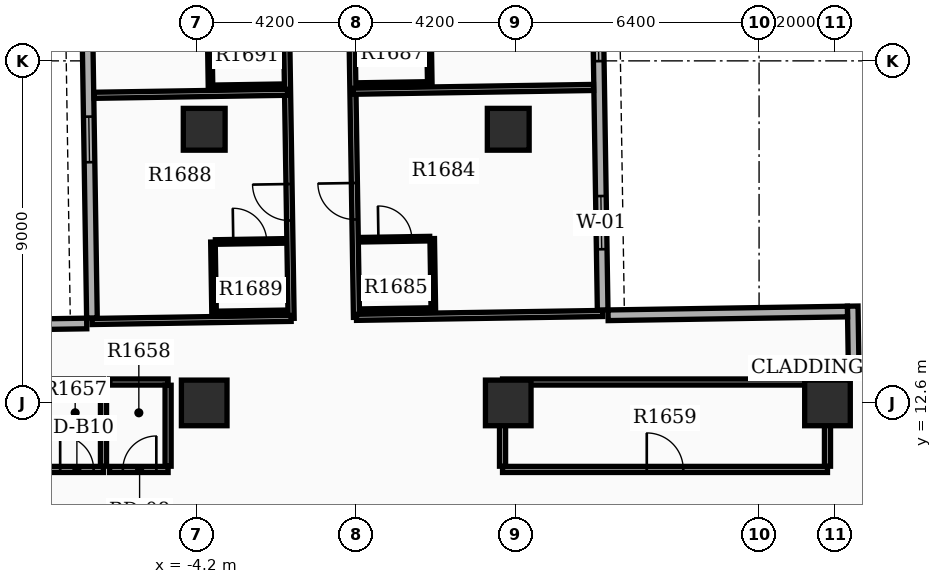
"""IFC4 building model, lengths in metres.
Left out: names, types, materials, properties, quantities, classifications, styles, units other than length and angle.
Written with IfcOpenShell. Run it as: python <this file> out.ifc"""

import sys

from ifc_helpers import new_model, si_unit, direction, frame, frame_2d, origin, origin_2d, place, context, subcontext, project, spatial, rectangle, extrude, element, fill, save


model = new_model("IFC4")
c1 = context("Model", 3, precision=1e-05, world=origin(), true_north=direction((0.0, 1.0)))
c2 = subcontext(c1, "Body", "Model", "MODEL_VIEW")
j1 = project(units=[si_unit("LENGTHUNIT", "METRE"), si_unit("PLANEANGLEUNIT", "RADIAN")], contexts=[c1])
p1 = place(None, origin())
s1 = spatial("IfcSite", under=j1, at=p1, CompositionType="ELEMENT")
p2 = place(p1, origin())
s2 = spatial("IfcBuilding", under=s1, at=p2, CompositionType="ELEMENT")
p3 = place(p2, frame((0.0, 0.0, 108.6)))
s3 = spatial("IfcBuildingStorey", under=s2, at=p3, CompositionType="ELEMENT", Elevation=108.6)
for number, where, z_axis, x_axis in (
    (1, (12.4, 12.6, 0.0), (0.0, 0.0, 1.0), (1.0, 0.0, 0.0)),
    (2, (4.0, 12.6, 0.0), (0.0, 0.0, 1.0), (1.0, 0.0, 0.0)),
    (3, (-4.0, 12.6, 0.0), (0.0, 0.0, 1.0), (1.0, 0.0, 0.0)),
):
    element("IfcColumn", number, at=place(p3, frame(where, z_axis=z_axis, x_axis=x_axis)), inside=s3, PredefinedType="COLUMN", context=c2, shape_type="SweptSolid", body=[
        extrude(rectangle(XDim=1.2, YDim=1.2, at=origin_2d()), origin(), (0.0, 0.0, 1.0), 3.9),
    ])
for number, where, z_axis, x_axis in (
    (4, (-4.0, 19.8, 0.0), (0.0, 0.0, 1.0), (1.0, 0.0, 0.0)),
    (5, (4.0, 19.8, 0.0), (0.0, 0.0, 1.0), (1.0, 0.0, 0.0)),
):
    element("IfcColumn", number, at=place(p3, frame(where, z_axis=z_axis, x_axis=x_axis)), inside=s3, PredefinedType="COLUMN", context=c2, shape_type="SweptSolid", body=[
        extrude(rectangle(XDim=1.1, YDim=1.1, at=origin_2d()), origin(), (0.0, 0.0, 1.0), 3.9),
    ])
p4 = place(p3, frame((6.485, 15.044, 0.0), z_axis=(0.0, 0.0, 1.0), x_axis=(-0.01571739401, 0.999876474133, 0.0)))
e6 = element("IfcWall", 6, at=p4, inside=s3, PredefinedType="STANDARD", context=c2, shape_type="SweptSolid", body=[
    extrude(rectangle(XDim=20.1, YDim=0.28, at=frame_2d((10.05, 0.0))), origin(), (0.0, 0.0, 1.0), 2.97),
])
p5 = place(p4, frame((1.6, 0.0, 0.8)))
e7 = element("IfcOpeningElement", 7, at=p5, cuts=e6, PredefinedType="OPENING", context=c2, shape_type="SweptSolid", body=[
    extrude(rectangle(XDim=1.4, YDim=1.6, at=frame_2d((0.7, 0.8))), frame((0.0, 0.15, 0.0), z_axis=(0.0, -1.0, 0.0), x_axis=(1.0, 0.0, 0.0)), (0.0, 0.0, 1.0), 0.3),
])
p6 = place(p4, frame((6.55, 0.0, 0.8)))
e8 = element("IfcOpeningElement", 8, at=p6, cuts=e6, PredefinedType="OPENING", context=c2, shape_type="SweptSolid", body=[
    extrude(rectangle(XDim=1.4, YDim=1.6, at=frame_2d((0.7, 0.8))), frame((0.0, 0.15, 0.0), z_axis=(0.0, -1.0, 0.0), x_axis=(1.0, 0.0, 0.0)), (0.0, 0.0, 1.0), 0.3),
])
p7 = place(p4, frame((10.25, 0.0, 0.8)))
e9 = element("IfcOpeningElement", 9, at=p7, cuts=e6, PredefinedType="OPENING", context=c2, shape_type="SweptSolid", body=[
    extrude(rectangle(XDim=1.4, YDim=1.6, at=frame_2d((0.7, 0.8))), frame((0.0, 0.15, 0.0), z_axis=(0.0, -1.0, 0.0), x_axis=(1.0, 0.0, 0.0)), (0.0, 0.0, 1.0), 0.3),
])
p8 = place(p4, frame((13.45, 0.0, 0.8)))
e10 = element("IfcOpeningElement", 10, at=p8, cuts=e6, PredefinedType="OPENING", context=c2, shape_type="SweptSolid", body=[
    extrude(rectangle(XDim=1.4, YDim=1.6, at=frame_2d((0.7, 0.8))), frame((0.0, 0.15, 0.0), z_axis=(0.0, -1.0, 0.0), x_axis=(1.0, 0.0, 0.0)), (0.0, 0.0, 1.0), 0.3),
])
p9 = place(p3, frame((-7.27, 34.93, 0.0), z_axis=(0.0, 0.0, 1.0), x_axis=(0.015705059908, -0.999876667941, 0.0)))
e11 = element("IfcWall", 11, at=p9, inside=s3, PredefinedType="STANDARD", context=c2, shape_type="SweptSolid", body=[
    extrude(rectangle(XDim=20.1, YDim=0.28, at=frame_2d((10.05, 0.0))), origin(), (0.0, 0.0, 1.0), 2.97),
])
p10 = place(p9, frame((1.6, 0.0, 0.8)))
e12 = element("IfcOpeningElement", 12, at=p10, cuts=e11, PredefinedType="OPENING", context=c2, shape_type="SweptSolid", body=[
    extrude(rectangle(XDim=1.4, YDim=1.6, at=frame_2d((0.7, 0.8))), frame((0.0, 0.15, 0.0), z_axis=(0.0, -1.0, 0.0), x_axis=(1.0, 0.0, 0.0)), (0.0, 0.0, 1.0), 0.3),
])
p11 = place(p9, frame((4.8, 0.0, 0.8)))
e13 = element("IfcOpeningElement", 13, at=p11, cuts=e11, PredefinedType="OPENING", context=c2, shape_type="SweptSolid", body=[
    extrude(rectangle(XDim=1.4, YDim=1.6, at=frame_2d((0.7, 0.8))), frame((0.0, 0.15, 0.0), z_axis=(0.0, -1.0, 0.0), x_axis=(1.0, 0.0, 0.0)), (0.0, 0.0, 1.0), 0.3),
])
p12 = place(p9, frame((8.0, 0.0, 0.8)))
e14 = element("IfcOpeningElement", 14, at=p12, cuts=e11, PredefinedType="OPENING", context=c2, shape_type="SweptSolid", body=[
    extrude(rectangle(XDim=1.4, YDim=1.6, at=frame_2d((0.7, 0.8))), frame((0.0, 0.15, 0.0), z_axis=(0.0, -1.0, 0.0), x_axis=(1.0, 0.0, 0.0)), (0.0, 0.0, 1.0), 0.3),
])
p13 = place(p9, frame((11.2, 0.0, 0.8)))
e15 = element("IfcOpeningElement", 15, at=p13, cuts=e11, PredefinedType="OPENING", context=c2, shape_type="SweptSolid", body=[
    extrude(rectangle(XDim=1.4, YDim=1.6, at=frame_2d((0.7, 0.8))), frame((0.0, 0.15, 0.0), z_axis=(0.0, -1.0, 0.0), x_axis=(1.0, 0.0, 0.0)), (0.0, 0.0, 1.0), 0.3),
])
p14 = place(p9, frame((14.799, 0.0, 0.85)))
e16 = element("IfcOpeningElement", 16, at=p14, cuts=e11, PredefinedType="OPENING", context=c2, shape_type="SweptSolid", body=[
    extrude(rectangle(XDim=1.2, YDim=1.6, at=frame_2d((0.6, 0.8))), frame((0.0, 0.15, 0.0), z_axis=(0.0, -1.0, 0.0), x_axis=(1.0, 0.0, 0.0)), (0.0, 0.0, 1.0), 0.3),
])
p15 = place(p3, frame((14.449, 13.529, 0.0), z_axis=(0.0, 0.0, 1.0), x_axis=(-0.999878147354, -0.015610587569, 0.0)))
e17 = element("IfcWall", 17, at=p15, inside=s3, PredefinedType="STANDARD", context=c2, shape_type="SweptSolid", body=[
    extrude(rectangle(XDim=1.22, YDim=0.28, at=frame_2d((0.61, 0.0))), origin(), (0.0, 0.0, 1.0), 2.97),
])
p16 = place(p3, frame((13.087, 13.647, 0.0), z_axis=(0.0, 0.0, 1.0), x_axis=(-0.015785793208, 0.999875396603, 0.0)))
e18 = element("IfcWall", 18, at=p16, inside=s3, PredefinedType="STANDARD", context=c2, shape_type="SweptSolid", body=[
    extrude(rectangle(XDim=1.5, YDim=0.28, at=frame_2d((0.75, 0.0))), origin(), (0.0, 0.0, 1.0), 2.97),
])
p17 = place(p3, frame((12.926, 15.005, 0.0), z_axis=(0.0, 0.0, 1.0), x_axis=(-0.999876823822, -0.015695132501, 0.0)))
e19 = element("IfcWall", 19, at=p17, inside=s3, PredefinedType="STANDARD", context=c2, shape_type="SweptSolid", body=[
    extrude(rectangle(XDim=6.3, YDim=0.28, at=frame_2d((3.15, 0.0))), origin(), (0.0, 0.0, 1.0), 2.97),
])
p18 = place(p3, frame((-13.391, 14.592, 0.0), z_axis=(0.0, 0.0, 1.0), x_axis=(0.999876833368, 0.015694524359, 0.0)))
e20 = element("IfcWall", 20, at=p18, inside=s3, PredefinedType="STANDARD", context=c2, shape_type="SweptSolid", body=[
    extrude(rectangle(XDim=6.3, YDim=0.28, at=frame_2d((3.15, 0.0))), origin(), (0.0, 0.0, 1.0), 2.97),
])
p19 = place(p3, frame((-8.14, 10.85, 0.0), z_axis=(0.0, 0.0, 1.0), x_axis=(1.0, 0.0, 0.0)))
e21 = element("IfcWall", 21, at=p19, inside=s3, PredefinedType="PARTITIONING", context=c2, shape_type="SweptSolid", body=[
    extrude(rectangle(XDim=1.49, YDim=0.16, at=frame_2d((0.745, 0.0))), origin(), (0.0, 0.0, 1.0), 2.96),
])
p20 = place(p19, frame((0.35, 0.0, 0.0)))
e22 = element("IfcOpeningElement", 22, at=p20, cuts=e21, PredefinedType="OPENING", context=c2, shape_type="SweptSolid", body=[
    extrude(rectangle(XDim=0.88, YDim=2.1, at=frame_2d((0.44, 1.05))), frame((0.0, 0.09, 0.0), z_axis=(0.0, -1.0, 0.0), x_axis=(1.0, 0.0, 0.0)), (0.0, 0.0, 1.0), 0.18),
])
p21 = place(p3, frame((-8.14, 13.15, 0.0), z_axis=(0.0, 0.0, 1.0), x_axis=(1.0, 0.0, 0.0)))
e23 = element("IfcWall", 23, at=p21, inside=s3, PredefinedType="PARTITIONING", context=c2, shape_type="SweptSolid", body=[
    extrude(rectangle(XDim=1.49, YDim=0.16, at=frame_2d((0.745, 0.0))), origin(), (0.0, 0.0, 1.0), 2.96),
])
p22 = place(p3, frame((-6.65, 10.935, 0.0), z_axis=(0.0, 0.0, 1.0), x_axis=(0.0, 1.0, 0.0)))
e24 = element("IfcWall", 24, at=p22, inside=s3, PredefinedType="PARTITIONING", context=c2, shape_type="SweptSolid", body=[
    extrude(rectangle(XDim=2.13, YDim=0.16, at=frame_2d((1.065, 0.0))), origin(), (0.0, 0.0, 1.0), 2.96),
])
p23 = place(p3, frame((-6.49, 10.85, 0.0), z_axis=(0.0, 0.0, 1.0), x_axis=(1.0, 0.0, 0.0)))
e25 = element("IfcWall", 25, at=p23, inside=s3, PredefinedType="PARTITIONING", context=c2, shape_type="SweptSolid", body=[
    extrude(rectangle(XDim=1.54, YDim=0.16, at=frame_2d((0.77, 0.0))), origin(), (0.0, 0.0, 1.0), 2.96),
])
p24 = place(p23, frame((0.35, 0.0, 0.0)))
e26 = element("IfcOpeningElement", 26, at=p24, cuts=e25, PredefinedType="OPENING", context=c2, shape_type="SweptSolid", body=[
    extrude(rectangle(XDim=0.88, YDim=2.15, at=frame_2d((0.44, 1.075))), frame((0.0, 0.09, 0.0), z_axis=(0.0, -1.0, 0.0), x_axis=(1.0, 0.0, 0.0)), (0.0, 0.0, 1.0), 0.18),
])
p25 = place(p3, frame((-6.49, 13.15, 0.0), z_axis=(0.0, 0.0, 1.0), x_axis=(1.0, 0.0, 0.0)))
e27 = element("IfcWall", 27, at=p25, inside=s3, PredefinedType="PARTITIONING", context=c2, shape_type="SweptSolid", body=[
    extrude(rectangle(XDim=1.54, YDim=0.16, at=frame_2d((0.77, 0.0))), origin(), (0.0, 0.0, 1.0), 2.96),
])
p26 = place(p3, frame((-4.95, 10.935, 0.0), z_axis=(0.0, 0.0, 1.0), x_axis=(0.0, 1.0, 0.0)))
e28 = element("IfcWall", 28, at=p26, inside=s3, PredefinedType="PARTITIONING", context=c2, shape_type="SweptSolid", body=[
    extrude(rectangle(XDim=2.13, YDim=0.16, at=frame_2d((1.065, 0.0))), origin(), (0.0, 0.0, 1.0), 2.96),
])
p27 = place(p3, frame((3.85, 10.85, 0.0), z_axis=(0.0, 0.0, 1.0), x_axis=(1.0, 0.0, 0.0)))
e29 = element("IfcWall", 29, at=p27, inside=s3, PredefinedType="PARTITIONING", context=c2, shape_type="SweptSolid", body=[
    extrude(rectangle(XDim=8.55, YDim=0.16, at=frame_2d((4.275, 0.0))), origin(), (0.0, 0.0, 1.0), 2.96),
])
p28 = place(p27, frame((3.795, 0.0, 0.0)))
e30 = element("IfcOpeningElement", 30, at=p28, cuts=e29, PredefinedType="OPENING", context=c2, shape_type="SweptSolid", body=[
    extrude(rectangle(XDim=0.96, YDim=2.15, at=frame_2d((0.48, 1.075))), frame((0.0, 0.09, 0.0), z_axis=(0.0, -1.0, 0.0), x_axis=(1.0, 0.0, 0.0)), (0.0, 0.0, 1.0), 0.18),
])
p29 = place(p3, frame((3.85, 13.15, 0.0), z_axis=(0.0, 0.0, 1.0), x_axis=(1.0, 0.0, 0.0)))
e31 = element("IfcWall", 31, at=p29, inside=s3, PredefinedType="PARTITIONING", context=c2, shape_type="SweptSolid", body=[
    extrude(rectangle(XDim=8.55, YDim=0.16, at=frame_2d((4.275, 0.0))), origin(), (0.0, 0.0, 1.0), 2.96),
])
for number, where, z_axis, x_axis in (
    (32, (3.85, 10.935, 0.0), (0.0, 0.0, 1.0), (0.0, 1.0, 0.0)),
    (33, (12.4, 10.935, 0.0), (0.0, 0.0, 1.0), (0.0, 1.0, 0.0)),
):
    element("IfcWall", number, at=place(p3, frame(where, z_axis=z_axis, x_axis=x_axis)), inside=s3, PredefinedType="PARTITIONING", context=c2, shape_type="SweptSolid", body=[
        extrude(rectangle(XDim=2.13, YDim=0.16, at=frame_2d((1.065, 0.0))), origin(), (0.0, 0.0, 1.0), 2.96),
    ])
p30 = place(p3, frame((0.007, 14.852, 0.0), z_axis=(0.0, 0.0, 1.0), x_axis=(-0.015680101899, 0.999877059645, 0.0)))
e34 = element("IfcWall", 34, at=p30, inside=s3, PredefinedType="PARTITIONING", context=c2, shape_type="SweptSolid", body=[
    extrude(rectangle(XDim=9.7, YDim=0.16, at=frame_2d((4.85, 0.0))), origin(), (0.0, 0.0, 1.0), 2.96),
])
p31 = place(p30, frame((2.575, 0.0, 0.0)))
e35 = element("IfcOpeningElement", 35, at=p31, cuts=e34, PredefinedType="OPENING", context=c2, shape_type="SweptSolid", body=[
    extrude(rectangle(XDim=0.96, YDim=2.15, at=frame_2d((0.48, 1.075))), frame((0.0, 0.09, 0.0), z_axis=(0.0, -1.0, 0.0), x_axis=(1.0, 0.0, 0.0)), (0.0, 0.0, 1.0), 0.18),
])
p32 = place(p30, frame((8.097, 0.0, 0.0)))
e36 = element("IfcOpeningElement", 36, at=p32, cuts=e34, PredefinedType="OPENING", context=c2, shape_type="SweptSolid", body=[
    extrude(rectangle(XDim=0.96, YDim=2.15, at=frame_2d((0.48, 1.075))), frame((0.0, 0.09, 0.0), z_axis=(0.0, -1.0, 0.0), x_axis=(1.0, 0.0, 0.0)), (0.0, 0.0, 1.0), 0.18),
])
p33 = place(p3, frame((0.007, 14.852, 0.0), z_axis=(0.0, 0.0, 1.0), x_axis=(0.999876577995, 0.015710785373, 0.0)))
e37 = element("IfcWall", 37, at=p33, inside=s3, PredefinedType="PARTITIONING", context=c2, shape_type="SweptSolid", body=[
    extrude(rectangle(XDim=6.48, YDim=0.16, at=frame_2d((3.24, 0.0))), origin(), (0.0, 0.0, 1.0), 2.96),
])
p34 = place(p3, frame((-0.087, 20.801, 0.0), z_axis=(0.0, 0.0, 1.0), x_axis=(0.999876857896, 0.015692961637, 0.0)))
e38 = element("IfcWall", 38, at=p34, inside=s3, PredefinedType="PARTITIONING", context=c2, shape_type="SweptSolid", body=[
    extrude(rectangle(XDim=6.332, YDim=0.16, at=frame_2d((3.166, 0.0))), origin(), (0.0, 0.0, 1.0), 2.96),
])
p35 = place(p3, frame((0.115, 16.894, 0.0), z_axis=(0.0, 0.0, 1.0), x_axis=(0.999874688728, 0.015830566654, 0.0)))
e39 = element("IfcWall", 39, at=p35, inside=s3, PredefinedType="PARTITIONING", context=c2, shape_type="SweptSolid", body=[
    extrude(rectangle(XDim=1.82, YDim=0.12, at=frame_2d((0.91, 0.0))), origin(), (0.0, 0.0, 1.0), 2.96),
])
p36 = place(p35, frame((0.47, 0.0, 0.0)))
e40 = element("IfcOpeningElement", 40, at=p36, cuts=e39, PredefinedType="OPENING", context=c2, shape_type="SweptSolid", body=[
    extrude(rectangle(XDim=0.88, YDim=2.1, at=frame_2d((0.44, 1.05))), frame((0.0, 0.07, 0.0), z_axis=(0.0, -1.0, 0.0), x_axis=(1.0, 0.0, 0.0)), (0.0, 0.0, 1.0), 0.14),
])
p37 = place(p3, frame((0.144, 15.014, 0.0), z_axis=(0.0, 0.0, 1.0), x_axis=(0.999876836305, 0.015694337248, 0.0)))
e41 = element("IfcWall", 41, at=p37, inside=s3, PredefinedType="PARTITIONING", context=c2, shape_type="SweptSolid", body=[
    extrude(rectangle(XDim=1.82, YDim=0.12, at=frame_2d((0.91, 0.0))), origin(), (0.0, 0.0, 1.0), 2.96),
])
p38 = place(p3, frame((2.029, 15.044, 0.0), z_axis=(0.0, 0.0, 1.0), x_axis=(-0.01571234584, 0.999876553475, 0.0)))
e42 = element("IfcWall", 42, at=p38, inside=s3, PredefinedType="PARTITIONING", context=c2, shape_type="SweptSolid", body=[
    extrude(rectangle(XDim=1.88, YDim=0.12, at=frame_2d((0.94, 0.0))), origin(), (0.0, 0.0, 1.0), 2.96),
])
p39 = place(p3, frame((0.051, 20.963, 0.0), z_axis=(0.0, 0.0, 1.0), x_axis=(0.999876836305, 0.015694337248, 0.0)))
e43 = element("IfcWall", 43, at=p39, inside=s3, PredefinedType="PARTITIONING", context=c2, shape_type="SweptSolid", body=[
    extrude(rectangle(XDim=1.82, YDim=0.12, at=frame_2d((0.91, 0.0))), origin(), (0.0, 0.0, 1.0), 2.96),
])
p40 = place(p3, frame((1.936, 20.993, 0.0), z_axis=(0.0, 0.0, 1.0), x_axis=(-0.015716050513, 0.999876495251, 0.0)))
e44 = element("IfcWall", 44, at=p40, inside=s3, PredefinedType="PARTITIONING", context=c2, shape_type="SweptSolid", body=[
    extrude(rectangle(XDim=1.6, YDim=0.12, at=frame_2d((0.8, 0.0))), origin(), (0.0, 0.0, 1.0), 2.96),
])
p41 = place(p3, frame((-1.713, 14.825, 0.0), z_axis=(0.0, 0.0, 1.0), x_axis=(-0.015705659641, 0.999876658521, 0.0)))
e45 = element("IfcWall", 45, at=p41, inside=s3, PredefinedType="PARTITIONING", context=c2, shape_type="SweptSolid", body=[
    extrude(rectangle(XDim=9.7, YDim=0.16, at=frame_2d((4.85, 0.0))), origin(), (0.0, 0.0, 1.0), 2.96),
])
p42 = place(p41, frame((2.575, 0.0, 0.0)))
e46 = element("IfcOpeningElement", 46, at=p42, cuts=e45, PredefinedType="OPENING", context=c2, shape_type="SweptSolid", body=[
    extrude(rectangle(XDim=0.96, YDim=2.15, at=frame_2d((0.48, 1.075))), frame((0.0, 0.09, 0.0), z_axis=(0.0, -1.0, 0.0), x_axis=(1.0, 0.0, 0.0)), (0.0, 0.0, 1.0), 0.18),
])
p43 = place(p41, frame((8.097, 0.0, 0.0)))
e47 = element("IfcOpeningElement", 47, at=p43, cuts=e45, PredefinedType="OPENING", context=c2, shape_type="SweptSolid", body=[
    extrude(rectangle(XDim=0.96, YDim=2.15, at=frame_2d((0.48, 1.075))), frame((0.0, 0.09, 0.0), z_axis=(0.0, -1.0, 0.0), x_axis=(1.0, 0.0, 0.0)), (0.0, 0.0, 1.0), 0.18),
])
p44 = place(p3, frame((-1.713, 14.825, 0.0), z_axis=(0.0, 0.0, 1.0), x_axis=(-0.99987672073, -0.015701698737, 0.0)))
e48 = element("IfcWall", 48, at=p44, inside=s3, PredefinedType="PARTITIONING", context=c2, shape_type="SweptSolid", body=[
    extrude(rectangle(XDim=5.24, YDim=0.16, at=frame_2d((2.62, 0.0))), origin(), (0.0, 0.0, 1.0), 2.96),
])
p45 = place(p3, frame((-1.806, 20.774, 0.0), z_axis=(0.0, 0.0, 1.0), x_axis=(-0.999876343559, -0.015725698427, 0.0)))
e49 = element("IfcWall", 49, at=p45, inside=s3, PredefinedType="PARTITIONING", context=c2, shape_type="SweptSolid", body=[
    extrude(rectangle(XDim=5.092, YDim=0.16, at=frame_2d((2.546, 0.0))), origin(), (0.0, 0.0, 1.0), 2.96),
])
p46 = place(p3, frame((-3.705, 16.834, 0.0), z_axis=(0.0, 0.0, 1.0), x_axis=(0.999876836305, 0.015694337248, 0.0)))
e50 = element("IfcWall", 50, at=p46, inside=s3, PredefinedType="PARTITIONING", context=c2, shape_type="SweptSolid", body=[
    extrude(rectangle(XDim=1.82, YDim=0.12, at=frame_2d((0.91, 0.0))), origin(), (0.0, 0.0, 1.0), 2.96),
])
p47 = place(p46, frame((0.47, 0.0, 0.0)))
e51 = element("IfcOpeningElement", 51, at=p47, cuts=e50, PredefinedType="OPENING", context=c2, shape_type="SweptSolid", body=[
    extrude(rectangle(XDim=0.88, YDim=2.1, at=frame_2d((0.44, 1.05))), frame((0.0, 0.07, 0.0), z_axis=(0.0, -1.0, 0.0), x_axis=(1.0, 0.0, 0.0)), (0.0, 0.0, 1.0), 0.14),
])
p48 = place(p3, frame((-3.675, 14.954, 0.0), z_axis=(0.0, 0.0, 1.0), x_axis=(0.999876803258, 0.015696442504, 0.0)))
e52 = element("IfcWall", 52, at=p48, inside=s3, PredefinedType="PARTITIONING", context=c2, shape_type="SweptSolid", body=[
    extrude(rectangle(XDim=1.82, YDim=0.12, at=frame_2d((0.91, 0.0))), origin(), (0.0, 0.0, 1.0), 2.96),
])
p49 = place(p3, frame((-3.74, 14.953, 0.0), z_axis=(0.0, 0.0, 1.0), x_axis=(-0.015842167482, 0.99987450499, 0.0)))
e53 = element("IfcWall", 53, at=p49, inside=s3, PredefinedType="PARTITIONING", context=c2, shape_type="SweptSolid", body=[
    extrude(rectangle(XDim=1.88, YDim=0.12, at=frame_2d((0.94, 0.0))), origin(), (0.0, 0.0, 1.0), 2.96),
])
p50 = place(p3, frame((-3.769, 20.903, 0.0), z_axis=(0.0, 0.0, 1.0), x_axis=(0.999876836305, 0.015694337248, 0.0)))
e54 = element("IfcWall", 54, at=p50, inside=s3, PredefinedType="PARTITIONING", context=c2, shape_type="SweptSolid", body=[
    extrude(rectangle(XDim=1.82, YDim=0.12, at=frame_2d((0.91, 0.0))), origin(), (0.0, 0.0, 1.0), 2.96),
])
p51 = place(p3, frame((-3.834, 20.902, 0.0), z_axis=(0.0, 0.0, 1.0), x_axis=(-0.015716050513, 0.999876495251, 0.0)))
e55 = element("IfcWall", 55, at=p51, inside=s3, PredefinedType="PARTITIONING", context=c2, shape_type="SweptSolid", body=[
    extrude(rectangle(XDim=1.6, YDim=0.12, at=frame_2d((0.8, 0.0))), origin(), (0.0, 0.0, 1.0), 2.96),
])
p52 = place(p5, origin())
e56 = element("IfcWindow", 56, at=p52, inside=s3, PartitioningType="SINGLE_PANEL", PredefinedType="WINDOW", context=c2, shape_type="SweptSolid", body=[
    extrude(rectangle(XDim=1.4, YDim=1.6, at=frame_2d((0.7, 0.8))), frame((0.0, 0.03, 0.0), z_axis=(0.0, -1.0, 0.0), x_axis=(1.0, 0.0, 0.0)), (0.0, 0.0, 1.0), 0.06),
])
fill(e7, e56)
p53 = place(p6, origin())
e57 = element("IfcWindow", 57, at=p53, inside=s3, PartitioningType="SINGLE_PANEL", PredefinedType="WINDOW", context=c2, shape_type="SweptSolid", body=[
    extrude(rectangle(XDim=1.4, YDim=1.6, at=frame_2d((0.7, 0.8))), frame((0.0, 0.03, 0.0), z_axis=(0.0, -1.0, 0.0), x_axis=(1.0, 0.0, 0.0)), (0.0, 0.0, 1.0), 0.06),
])
fill(e8, e57)
p54 = place(p14, origin())
e58 = element("IfcWindow", 58, at=p54, inside=s3, PartitioningType="SINGLE_PANEL", PredefinedType="WINDOW", context=c2, shape_type="SweptSolid", body=[
    extrude(rectangle(XDim=1.2, YDim=1.6, at=frame_2d((0.6, 0.8))), frame((0.0, 0.03, 0.0), z_axis=(0.0, -1.0, 0.0), x_axis=(1.0, 0.0, 0.0)), (0.0, 0.0, 1.0), 0.06),
])
fill(e16, e58)
p55 = place(p20, origin())
e59 = element("IfcDoor", 59, at=p55, inside=s3, OperationType="SINGLE_SWING_LEFT", PredefinedType="DOOR", context=c2, shape_type="SweptSolid", body=[
    extrude(rectangle(XDim=0.88, YDim=2.1, at=frame_2d((0.44, 1.05))), frame((0.0, 0.025, 0.0), z_axis=(0.0, -1.0, 0.0), x_axis=(1.0, 0.0, 0.0)), (0.0, 0.0, 1.0), 0.05),
])
fill(e22, e59)
p56 = place(p24, origin())
e60 = element("IfcDoor", 60, at=p56, inside=s3, OperationType="SINGLE_SWING_RIGHT", PredefinedType="DOOR", context=c2, shape_type="SweptSolid", body=[
    extrude(rectangle(XDim=0.88, YDim=2.15, at=frame_2d((0.44, 1.075))), frame((0.0, 0.025, 0.0), z_axis=(0.0, -1.0, 0.0), x_axis=(1.0, 0.0, 0.0)), (0.0, 0.0, 1.0), 0.05),
])
fill(e26, e60)
p57 = place(p28, origin())
e61 = element("IfcDoor", 61, at=p57, inside=s3, OperationType="SINGLE_SWING_LEFT", PredefinedType="DOOR", context=c2, shape_type="SweptSolid", body=[
    extrude(rectangle(XDim=0.96, YDim=2.15, at=frame_2d((0.48, 1.075))), frame((0.0, 0.025, 0.0), z_axis=(0.0, -1.0, 0.0), x_axis=(1.0, 0.0, 0.0)), (0.0, 0.0, 1.0), 0.05),
])
fill(e30, e61)
p58 = place(p31, origin())
e62 = element("IfcDoor", 62, at=p58, inside=s3, OperationType="SINGLE_SWING_RIGHT", PredefinedType="DOOR", context=c2, shape_type="SweptSolid", body=[
    extrude(rectangle(XDim=0.96, YDim=2.15, at=frame_2d((0.48, 1.075))), frame((0.0, 0.025, 0.0), z_axis=(0.0, -1.0, 0.0), x_axis=(1.0, 0.0, 0.0)), (0.0, 0.0, 1.0), 0.05),
])
fill(e35, e62)
p59 = place(p36, origin())
e63 = element("IfcDoor", 63, at=p59, inside=s3, OperationType="SINGLE_SWING_LEFT", PredefinedType="DOOR", context=c2, shape_type="SweptSolid", body=[
    extrude(rectangle(XDim=0.88, YDim=2.1, at=frame_2d((0.44, 1.05))), frame((0.0, 0.025, 0.0), z_axis=(0.0, -1.0, 0.0), x_axis=(1.0, 0.0, 0.0)), (0.0, 0.0, 1.0), 0.05),
])
fill(e40, e63)
p60 = place(p42, origin())
e64 = element("IfcDoor", 64, at=p60, inside=s3, OperationType="SINGLE_SWING_RIGHT", PredefinedType="DOOR", context=c2, shape_type="SweptSolid", body=[
    extrude(rectangle(XDim=0.96, YDim=2.15, at=frame_2d((0.48, 1.075))), frame((0.0, 0.025, 0.0), z_axis=(0.0, -1.0, 0.0), x_axis=(1.0, 0.0, 0.0)), (0.0, 0.0, 1.0), 0.05),
])
fill(e46, e64)
p61 = place(p47, origin())
e65 = element("IfcDoor", 65, at=p61, inside=s3, OperationType="SINGLE_SWING_LEFT", PredefinedType="DOOR", context=c2, shape_type="SweptSolid", body=[
    extrude(rectangle(XDim=0.88, YDim=2.1, at=frame_2d((0.44, 1.05))), frame((0.0, 0.025, 0.0), z_axis=(0.0, -1.0, 0.0), x_axis=(1.0, 0.0, 0.0)), (0.0, 0.0, 1.0), 0.05),
])
fill(e51, e65)
save(model, sys.argv[1])
